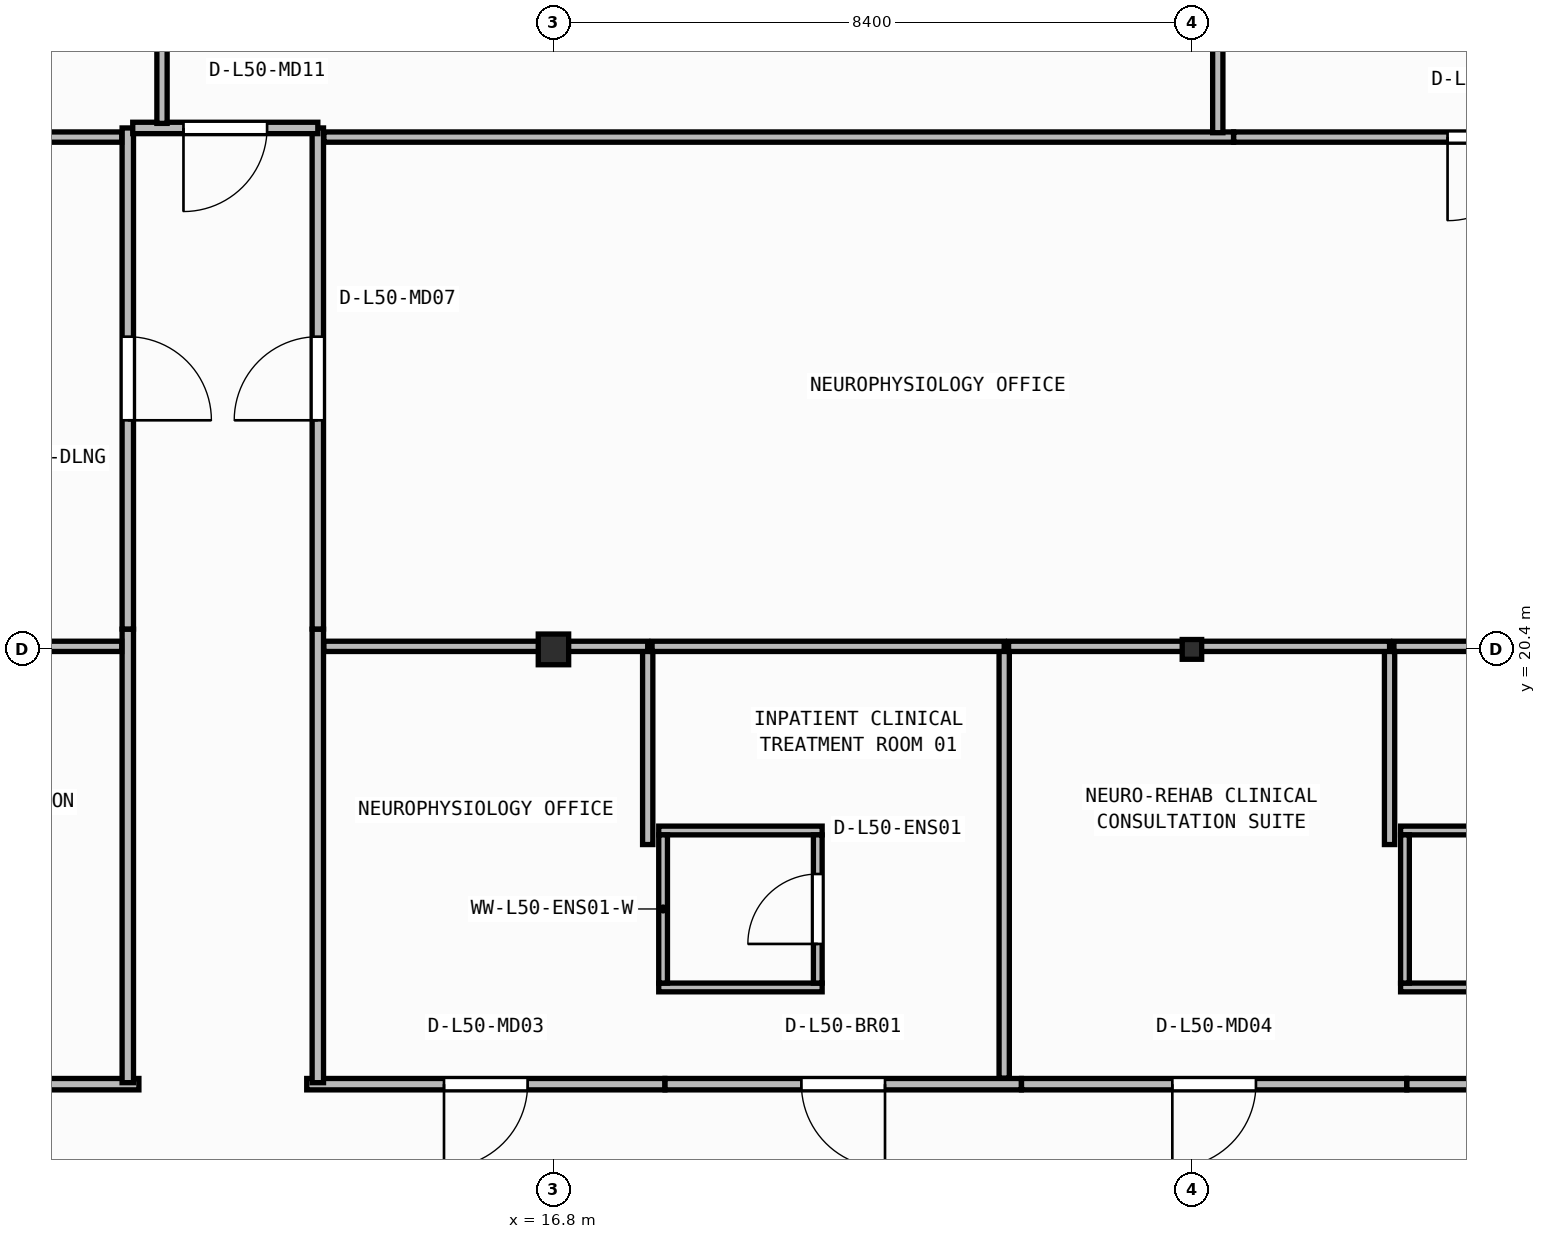
"""IFC4 building model, lengths in metres.
Left out: names, types, materials, properties, quantities, classifications, styles, units other than length and angle.
Written with IfcOpenShell. Run it as: python <this file> out.ifc"""

import sys

from ifc_helpers import new_model, si_unit, direction, frame, frame_2d, origin, origin_2d, place, context, subcontext, project, spatial, rectangle, i_section, extrude, element, fill, save


model = new_model("IFC4")
c1 = context("Model", 3, precision=1e-05, world=origin(), true_north=direction((0.0, 1.0)))
c2 = subcontext(c1, "Body", "Model", "MODEL_VIEW")
j1 = project(units=[si_unit("LENGTHUNIT", "METRE"), si_unit("PLANEANGLEUNIT", "RADIAN")], contexts=[c1])
p1 = place(None, origin())
s1 = spatial("IfcSite", under=j1, at=p1, CompositionType="ELEMENT")
p2 = place(p1, origin())
s2 = spatial("IfcBuilding", under=s1, at=p2, CompositionType="ELEMENT")
p3 = place(p2, frame((0.0, 0.0, 203.95)))
s3 = spatial("IfcBuildingStorey", under=s2, at=p3, CompositionType="ELEMENT", Elevation=203.95)
p4 = place(p3, frame((16.8, 20.4, 0.0), z_axis=(0.0, 0.0, 1.0), x_axis=(1.0, 0.0, 0.0)))
e1 = element("IfcColumn", 1, at=p4, inside=s3, PredefinedType="COLUMN", context=c2, shape_type="SweptSolid", body=[
    extrude(i_section(OverallWidth=0.4, OverallDepth=0.404, WebThickness=0.02, FlangeThickness=0.032, at=origin_2d()), origin(), (0.0, 0.0, 1.0), 3.95),
])
p5 = place(p3, frame((25.2, 20.4, 0.0), z_axis=(0.0, 0.0, 1.0), x_axis=(1.0, 0.0, 0.0)))
e2 = element("IfcColumn", 2, at=p5, inside=s3, PredefinedType="COLUMN", context=c2, shape_type="SweptSolid", body=[
    extrude(i_section(OverallWidth=0.256, OverallDepth=0.26, WebThickness=0.01, FlangeThickness=0.017, FilletRadius=0.013, at=origin_2d()), origin(), (0.0, 0.0, 1.0), 3.95),
])
for number, where, z_axis, x_axis in (
    (3, (18.185, 15.952, 0.0), (0.0, 0.0, 1.0), (1.0, 0.0, 0.0)),
    (4, (18.185, 18.018, 0.0), (0.0, 0.0, 1.0), (1.0, 0.0, 0.0)),
):
    element("IfcWall", number, at=place(p3, frame(where, z_axis=z_axis, x_axis=x_axis)), inside=s3, PredefinedType="PARTITIONING", context=c2, shape_type="SweptSolid", body=[
        extrude(rectangle(XDim=2.15, YDim=0.115, at=frame_2d((1.075, 0.0))), origin(), (0.0, 0.0, 1.0), 3.71),
    ])
p6 = place(p3, frame((18.242, 16.01, 0.0), z_axis=(0.0, 0.0, 1.0), x_axis=(0.0, 1.0, 0.0)))
e5 = element("IfcWall", 5, at=p6, inside=s3, PredefinedType="PARTITIONING", context=c2, shape_type="SweptSolid", body=[
    extrude(rectangle(XDim=1.95, YDim=0.115, at=frame_2d((0.975, 0.0))), origin(), (0.0, 0.0, 1.0), 3.71),
])
p7 = place(p3, frame((20.278, 16.01, 0.0), z_axis=(0.0, 0.0, 1.0), x_axis=(0.0, 1.0, 0.0)))
e6 = element("IfcWall", 6, at=p7, inside=s3, PredefinedType="PARTITIONING", context=c2, shape_type="SweptSolid", body=[
    extrude(rectangle(XDim=1.95, YDim=0.115, at=frame_2d((0.975, 0.0))), origin(), (0.0, 0.0, 1.0), 3.71),
])
p8 = place(p7, frame((0.515, 0.0, 0.0)))
e7 = element("IfcOpeningElement", 7, at=p8, cuts=e6, PredefinedType="OPENING", context=c2, shape_type="SweptSolid", body=[
    extrude(rectangle(XDim=0.92, YDim=2.1, at=frame_2d((0.46, 1.05))), frame((0.0, 0.067, 0.0), z_axis=(0.0, -1.0, 0.0), x_axis=(1.0, 0.0, 0.0)), (0.0, 0.0, 1.0), 0.135),
])
p9 = place(p3, frame((27.945, 15.952, 0.0), z_axis=(0.0, 0.0, 1.0), x_axis=(1.0, 0.0, 0.0)))
e8 = element("IfcWall", 8, at=p9, inside=s3, PredefinedType="PARTITIONING", context=c2, shape_type="SweptSolid", body=[
    extrude(rectangle(XDim=2.15, YDim=0.115, at=frame_2d((1.075, 0.0))), origin(), (0.0, 0.0, 1.0), 3.381),
])
p10 = place(p3, frame((27.945, 18.018, 0.0), z_axis=(0.0, 0.0, 1.0), x_axis=(1.0, 0.0, 0.0)))
e9 = element("IfcWall", 9, at=p10, inside=s3, PredefinedType="PARTITIONING", context=c2, shape_type="SweptSolid", body=[
    extrude(rectangle(XDim=2.15, YDim=0.115, at=frame_2d((1.075, 0.0))), origin(), (0.0, 0.0, 1.0), 3.71),
])
p11 = place(p3, frame((28.002, 16.01, 0.0), z_axis=(0.0, 0.0, 1.0), x_axis=(0.0, 1.0, 0.0)))
e10 = element("IfcWall", 10, at=p11, inside=s3, PredefinedType="PARTITIONING", context=c2, shape_type="SweptSolid", body=[
    extrude(rectangle(XDim=1.95, YDim=0.115, at=frame_2d((0.975, 0.0))), origin(), (0.0, 0.0, 1.0), 3.71),
])
p12 = place(p3, frame((11.346, 14.68, 0.0), z_axis=(0.0, 0.0, 1.0), x_axis=(-1.0, 0.0, 0.0)))
e11 = element("IfcWall", 11, at=p12, inside=s3, PredefinedType="PARTITIONING", context=c2, shape_type="SweptSolid", body=[
    extrude(rectangle(XDim=4.254, YDim=0.15, at=frame_2d((2.127, 0.0))), origin(), (0.0, 0.0, 1.0), 3.71),
])
p13 = place(p12, frame((1.577, 0.0, 0.0)))
e12 = element("IfcOpeningElement", 12, at=p13, cuts=e11, PredefinedType="OPENING", context=c2, shape_type="SweptSolid", body=[
    extrude(rectangle(XDim=1.1, YDim=2.1, at=frame_2d((0.55, 1.05))), frame((0.0, 0.085, 0.0), z_axis=(0.0, -1.0, 0.0), x_axis=(1.0, 0.0, 0.0)), (0.0, 0.0, 1.0), 0.17),
])
p14 = place(p3, frame((18.266, 14.68, 0.0), z_axis=(0.0, 0.0, 1.0), x_axis=(-1.0, 0.0, 0.0)))
e13 = element("IfcWall", 13, at=p14, inside=s3, PredefinedType="PARTITIONING", context=c2, shape_type="SweptSolid", body=[
    extrude(rectangle(XDim=4.712, YDim=0.15, at=frame_2d((2.356, 0.0))), origin(), (0.0, 0.0, 1.0), 3.71),
])
p15 = place(p14, frame((1.806, 0.0, 0.0)))
e14 = element("IfcOpeningElement", 14, at=p15, cuts=e13, PredefinedType="OPENING", context=c2, shape_type="SweptSolid", body=[
    extrude(rectangle(XDim=1.1, YDim=2.1, at=frame_2d((0.55, 1.05))), frame((0.0, 0.085, 0.0), z_axis=(0.0, -1.0, 0.0), x_axis=(1.0, 0.0, 0.0)), (0.0, 0.0, 1.0), 0.17),
])
p16 = place(p3, frame((22.956, 14.68, 0.0), z_axis=(0.0, 0.0, 1.0), x_axis=(-1.0, 0.0, 0.0)))
e15 = element("IfcWall", 15, at=p16, inside=s3, PredefinedType="PARTITIONING", context=c2, shape_type="SweptSolid", body=[
    extrude(rectangle(XDim=4.688, YDim=0.15, at=frame_2d((2.344, 0.0))), origin(), (0.0, 0.0, 1.0), 3.71),
])
p17 = place(p16, frame((1.794, 0.0, 0.0)))
e16 = element("IfcOpeningElement", 16, at=p17, cuts=e15, PredefinedType="OPENING", context=c2, shape_type="SweptSolid", body=[
    extrude(rectangle(XDim=1.1, YDim=2.1, at=frame_2d((0.55, 1.05))), frame((0.0, 0.085, 0.0), z_axis=(0.0, -1.0, 0.0), x_axis=(1.0, 0.0, 0.0)), (0.0, 0.0, 1.0), 0.17),
])
p18 = place(p3, frame((28.026, 14.68, 0.0), z_axis=(0.0, 0.0, 1.0), x_axis=(-1.0, 0.0, 0.0)))
e17 = element("IfcWall", 17, at=p18, inside=s3, PredefinedType="PARTITIONING", context=c2, shape_type="SweptSolid", body=[
    extrude(rectangle(XDim=5.068, YDim=0.15, at=frame_2d((2.534, 0.0))), origin(), (0.0, 0.0, 1.0), 3.71),
])
p19 = place(p18, frame((1.984, 0.0, 0.0)))
e18 = element("IfcOpeningElement", 18, at=p19, cuts=e17, PredefinedType="OPENING", context=c2, shape_type="SweptSolid", body=[
    extrude(rectangle(XDim=1.1, YDim=2.1, at=frame_2d((0.55, 1.05))), frame((0.0, 0.085, 0.0), z_axis=(0.0, -1.0, 0.0), x_axis=(1.0, 0.0, 0.0)), (0.0, 0.0, 1.0), 0.17),
])
p20 = place(p3, frame((32.346, 14.68, 0.0), z_axis=(0.0, 0.0, 1.0), x_axis=(-1.0, 0.0, 0.0)))
e19 = element("IfcWall", 19, at=p20, inside=s3, PredefinedType="PARTITIONING", context=c2, shape_type="SweptSolid", body=[
    extrude(rectangle(XDim=4.318, YDim=0.15, at=frame_2d((2.159, 0.0))), origin(), (0.0, 0.0, 1.0), 3.71),
])
p21 = place(p20, frame((1.609, 0.0, 0.0)))
e20 = element("IfcOpeningElement", 20, at=p21, cuts=e19, PredefinedType="OPENING", context=c2, shape_type="SweptSolid", body=[
    extrude(rectangle(XDim=1.1, YDim=2.1, at=frame_2d((0.55, 1.05))), frame((0.0, 0.085, 0.0), z_axis=(0.0, -1.0, 0.0), x_axis=(1.0, 0.0, 0.0)), (0.0, 0.0, 1.0), 0.17),
])
for number, where, z_axis, x_axis in (
    (21, (11.2, 20.666, 0.0), (0.0, 0.0, 1.0), (0.0, -1.0, 0.0)),
    (22, (13.7, 14.7, 0.0), (0.0, 0.0, 1.0), (0.0, 1.0, 0.0)),
):
    element("IfcWall", number, at=place(p3, frame(where, z_axis=z_axis, x_axis=x_axis)), inside=s3, PredefinedType="PARTITIONING", context=c2, shape_type="SweptSolid", body=[
        extrude(rectangle(XDim=5.966, YDim=0.15, at=frame_2d((2.983, 0.0))), origin(), (0.0, 0.0, 1.0), 3.71),
    ])
p22 = place(p3, frame((11.2, 27.26, 0.0), z_axis=(0.0, 0.0, 1.0), x_axis=(0.0, -1.0, 0.0)))
e23 = element("IfcWall", 23, at=p22, inside=s3, PredefinedType="PARTITIONING", context=c2, shape_type="SweptSolid", body=[
    extrude(rectangle(XDim=6.592, YDim=0.15, at=frame_2d((3.296, 0.0))), origin(), (0.0, 0.0, 1.0), 3.71),
])
p23 = place(p22, frame((2.746, 0.0, 0.0)))
e24 = element("IfcOpeningElement", 24, at=p23, cuts=e23, PredefinedType="OPENING", context=c2, shape_type="SweptSolid", body=[
    extrude(rectangle(XDim=1.1, YDim=2.1, at=frame_2d((0.55, 1.05))), frame((0.0, 0.085, 0.0), z_axis=(0.0, -1.0, 0.0), x_axis=(1.0, 0.0, 0.0)), (0.0, 0.0, 1.0), 0.17),
])
p24 = place(p3, frame((13.7, 20.668, 0.0), z_axis=(0.0, 0.0, 1.0), x_axis=(0.0, 1.0, 0.0)))
e25 = element("IfcWall", 25, at=p24, inside=s3, PredefinedType="PARTITIONING", context=c2, shape_type="SweptSolid", body=[
    extrude(rectangle(XDim=6.592, YDim=0.15, at=frame_2d((3.296, 0.0))), origin(), (0.0, 0.0, 1.0), 3.71),
])
p25 = place(p24, frame((2.746, 0.0, 0.0)))
e26 = element("IfcOpeningElement", 26, at=p25, cuts=e25, PredefinedType="OPENING", context=c2, shape_type="SweptSolid", body=[
    extrude(rectangle(XDim=1.1, YDim=2.1, at=frame_2d((0.55, 1.05))), frame((0.0, 0.085, 0.0), z_axis=(0.0, -1.0, 0.0), x_axis=(1.0, 0.0, 0.0)), (0.0, 0.0, 1.0), 0.17),
])
p26 = place(p3, frame((13.7, 27.26, 0.0), z_axis=(0.0, 0.0, 1.0), x_axis=(-1.0, 0.0, 0.0)))
e27 = element("IfcWall", 27, at=p26, inside=s3, PredefinedType="PARTITIONING", context=c2, shape_type="SweptSolid", body=[
    extrude(rectangle(XDim=2.435, YDim=0.15, at=frame_2d((1.218, 0.0))), origin(), (0.0, 0.0, 1.0), 3.71),
])
p27 = place(p26, frame((0.667, 0.0, 0.0)))
e28 = element("IfcOpeningElement", 28, at=p27, cuts=e27, PredefinedType="OPENING", context=c2, shape_type="SweptSolid", body=[
    extrude(rectangle(XDim=1.1, YDim=2.1, at=frame_2d((0.55, 1.05))), frame((0.0, 0.085, 0.0), z_axis=(0.0, -1.0, 0.0), x_axis=(1.0, 0.0, 0.0)), (0.0, 0.0, 1.0), 0.17),
])
p28 = place(p3, frame((11.12, 20.44, 0.0), z_axis=(0.0, 0.0, 1.0), x_axis=(-1.0, 0.0, 0.0)))
e29 = element("IfcWall", 29, at=p28, inside=s3, PredefinedType="PARTITIONING", context=c2, shape_type="SweptSolid", body=[
    extrude(rectangle(XDim=5.653, YDim=0.135, at=frame_2d((2.826, 0.0))), origin(), (0.0, 0.0, 1.0), 3.152),
])
p29 = place(p3, frame((18.04, 17.833, 0.0), z_axis=(0.0, 0.0, 1.0), x_axis=(0.0, 1.0, 0.0)))
e30 = element("IfcWall", 30, at=p29, inside=s3, PredefinedType="PARTITIONING", context=c2, shape_type="SweptSolid", body=[
    extrude(rectangle(XDim=2.607, YDim=0.135, at=frame_2d((1.304, 0.0))), origin(), (0.0, 0.0, 1.0), 3.71),
])
p30 = place(p3, frame((18.04, 20.44, 0.0), z_axis=(0.0, 0.0, 1.0), x_axis=(-1.0, 0.0, 0.0)))
e31 = element("IfcWall", 31, at=p30, inside=s3, PredefinedType="PARTITIONING", context=c2, shape_type="SweptSolid", body=[
    extrude(rectangle(XDim=4.26, YDim=0.135, at=frame_2d((2.13, 0.0))), origin(), (0.0, 0.0, 1.0), 3.152),
])
p31 = place(p3, frame((22.73, 14.76, 0.0), z_axis=(0.0, 0.0, 1.0), x_axis=(0.0, 1.0, 0.0)))
e32 = element("IfcWall", 32, at=p31, inside=s3, PredefinedType="PARTITIONING", context=c2, shape_type="SweptSolid", body=[
    extrude(rectangle(XDim=5.68, YDim=0.135, at=frame_2d((2.84, 0.0))), origin(), (0.0, 0.0, 1.0), 3.71),
])
p32 = place(p3, frame((22.73, 20.44, 0.0), z_axis=(0.0, 0.0, 1.0), x_axis=(-1.0, 0.0, 0.0)))
e33 = element("IfcWall", 33, at=p32, inside=s3, PredefinedType="PARTITIONING", context=c2, shape_type="SweptSolid", body=[
    extrude(rectangle(XDim=4.633, YDim=0.135, at=frame_2d((2.316, 0.0))), origin(), (0.0, 0.0, 1.0), 3.152),
])
p33 = place(p3, frame((27.8, 17.833, 0.0), z_axis=(0.0, 0.0, 1.0), x_axis=(0.0, 1.0, 0.0)))
e34 = element("IfcWall", 34, at=p33, inside=s3, PredefinedType="PARTITIONING", context=c2, shape_type="SweptSolid", body=[
    extrude(rectangle(XDim=2.607, YDim=0.135, at=frame_2d((1.304, 0.0))), origin(), (0.0, 0.0, 1.0), 3.71),
])
p34 = place(p3, frame((27.8, 20.44, 0.0), z_axis=(0.0, 0.0, 1.0), x_axis=(-1.0, 0.0, 0.0)))
e35 = element("IfcWall", 35, at=p34, inside=s3, PredefinedType="PARTITIONING", context=c2, shape_type="SweptSolid", body=[
    extrude(rectangle(XDim=5.012, YDim=0.135, at=frame_2d((2.506, 0.0))), origin(), (0.0, 0.0, 1.0), 3.152),
])
p35 = place(p3, frame((30.137, 20.44, 0.0), z_axis=(0.0, 0.0, 1.0), x_axis=(-1.0, 0.0, 0.0)))
e36 = element("IfcWall", 36, at=p35, inside=s3, PredefinedType="PARTITIONING", context=c2, shape_type="SweptSolid", body=[
    extrude(rectangle(XDim=2.28, YDim=0.135, at=frame_2d((1.14, 0.0))), origin(), (0.0, 0.0, 1.0), 3.152),
])
p36 = place(p3, frame((11.12, 27.14, 0.0), z_axis=(0.0, 0.0, 1.0), x_axis=(-1.0, 0.0, 0.0)))
e37 = element("IfcWall", 37, at=p36, inside=s3, PredefinedType="PARTITIONING", context=c2, shape_type="SweptSolid", body=[
    extrude(rectangle(XDim=10.88, YDim=0.135, at=frame_2d((5.44, 0.0))), origin(), (0.0, 0.0, 1.0), 3.71),
])
p37 = place(p36, frame((5.828, 0.0, 0.0)))
e38 = element("IfcOpeningElement", 38, at=p37, cuts=e37, PredefinedType="OPENING", context=c2, shape_type="SweptSolid", body=[
    extrude(rectangle(XDim=1.1, YDim=2.1, at=frame_2d((0.55, 1.05))), frame((0.0, 0.077, 0.0), z_axis=(0.0, -1.0, 0.0), x_axis=(1.0, 0.0, 0.0)), (0.0, 0.0, 1.0), 0.155),
])
p38 = place(p3, frame((25.748, 27.14, 0.0), z_axis=(0.0, 0.0, 1.0), x_axis=(-1.0, 0.0, 0.0)))
e39 = element("IfcWall", 39, at=p38, inside=s3, PredefinedType="PARTITIONING", context=c2, shape_type="SweptSolid", body=[
    extrude(rectangle(XDim=11.968, YDim=0.135, at=frame_2d((5.984, 0.0))), origin(), (0.0, 0.0, 1.0), 3.71),
])
p39 = place(p3, frame((29.93, 27.14, 0.0), z_axis=(0.0, 0.0, 1.0), x_axis=(-1.0, 0.0, 0.0)))
e40 = element("IfcWall", 40, at=p39, inside=s3, PredefinedType="PARTITIONING", context=c2, shape_type="SweptSolid", body=[
    extrude(rectangle(XDim=4.18, YDim=0.135, at=frame_2d((2.09, 0.0))), origin(), (0.0, 0.0, 1.0), 3.71),
])
p40 = place(p39, frame((0.267, 0.0, 0.0)))
e41 = element("IfcOpeningElement", 41, at=p40, cuts=e40, PredefinedType="OPENING", context=c2, shape_type="SweptSolid", body=[
    extrude(rectangle(XDim=1.1, YDim=2.1, at=frame_2d((0.55, 1.05))), frame((0.0, 0.077, 0.0), z_axis=(0.0, -1.0, 0.0), x_axis=(1.0, 0.0, 0.0)), (0.0, 0.0, 1.0), 0.155),
])
p41 = place(p3, frame((11.65, 27.32, 0.0), z_axis=(0.0, 0.0, 1.0), x_axis=(0.0, 1.0, 0.0)))
e42 = element("IfcWall", 42, at=p41, inside=s3, PredefinedType="PARTITIONING", context=c2, shape_type="SweptSolid", body=[
    extrude(rectangle(XDim=9.203, YDim=0.135, at=frame_2d((4.602, 0.0))), origin(), (0.0, 0.0, 1.0), 3.71),
])
p42 = place(p3, frame((25.54, 27.198, 0.0), z_axis=(0.0, 0.0, 1.0), x_axis=(0.0, 1.0, 0.0)))
e43 = element("IfcWall", 43, at=p42, inside=s3, PredefinedType="PARTITIONING", context=c2, shape_type="SweptSolid", body=[
    extrude(rectangle(XDim=4.281, YDim=0.135, at=frame_2d((2.141, 0.0))), origin(), (0.0, 0.0, 1.0), 3.157),
])
p43 = place(p8, origin())
e44 = element("IfcDoor", 44, at=p43, inside=s3, OperationType="SINGLE_SWING_LEFT", PredefinedType="DOOR", context=c2, shape_type="SweptSolid", body=[
    extrude(rectangle(XDim=0.92, YDim=2.1, at=frame_2d((0.46, 1.05))), frame((0.0, 0.025, 0.0), z_axis=(0.0, -1.0, 0.0), x_axis=(1.0, 0.0, 0.0)), (0.0, 0.0, 1.0), 0.05),
])
fill(e7, e44)
p44 = place(p15, origin())
e45 = element("IfcDoor", 45, at=p44, inside=s3, OperationType="SINGLE_SWING_RIGHT", PredefinedType="DOOR", context=c2, shape_type="SweptSolid", body=[
    extrude(rectangle(XDim=1.1, YDim=2.1, at=frame_2d((0.55, 1.05))), frame((0.0, 0.025, 0.0), z_axis=(0.0, -1.0, 0.0), x_axis=(1.0, 0.0, 0.0)), (0.0, 0.0, 1.0), 0.05),
])
fill(e14, e45)
p45 = place(p17, origin())
e46 = element("IfcDoor", 46, at=p45, inside=s3, OperationType="SINGLE_SWING_LEFT", PredefinedType="DOOR", context=c2, shape_type="SweptSolid", body=[
    extrude(rectangle(XDim=1.1, YDim=2.1, at=frame_2d((0.55, 1.05))), frame((0.0, 0.025, 0.0), z_axis=(0.0, -1.0, 0.0), x_axis=(1.0, 0.0, 0.0)), (0.0, 0.0, 1.0), 0.05),
])
fill(e16, e46)
p46 = place(p19, origin())
e47 = element("IfcDoor", 47, at=p46, inside=s3, OperationType="SINGLE_SWING_RIGHT", PredefinedType="DOOR", context=c2, shape_type="SweptSolid", body=[
    extrude(rectangle(XDim=1.1, YDim=2.1, at=frame_2d((0.55, 1.05))), frame((0.0, 0.025, 0.0), z_axis=(0.0, -1.0, 0.0), x_axis=(1.0, 0.0, 0.0)), (0.0, 0.0, 1.0), 0.05),
])
fill(e18, e47)
p47 = place(p23, origin())
e48 = element("IfcDoor", 48, at=p47, inside=s3, OperationType="SINGLE_SWING_RIGHT", PredefinedType="DOOR", context=c2, shape_type="SweptSolid", body=[
    extrude(rectangle(XDim=1.1, YDim=2.1, at=frame_2d((0.55, 1.05))), frame((0.0, 0.025, 0.0), z_axis=(0.0, -1.0, 0.0), x_axis=(1.0, 0.0, 0.0)), (0.0, 0.0, 1.0), 0.05),
])
fill(e24, e48)
p48 = place(p25, origin())
e49 = element("IfcDoor", 49, at=p48, inside=s3, OperationType="SINGLE_SWING_LEFT", PredefinedType="DOOR", context=c2, shape_type="SweptSolid", body=[
    extrude(rectangle(XDim=1.1, YDim=2.1, at=frame_2d((0.55, 1.05))), frame((0.0, 0.025, 0.0), z_axis=(0.0, -1.0, 0.0), x_axis=(1.0, 0.0, 0.0)), (0.0, 0.0, 1.0), 0.05),
])
fill(e26, e49)
p49 = place(p27, origin())
e50 = element("IfcDoor", 50, at=p49, inside=s3, OperationType="SINGLE_SWING_RIGHT", PredefinedType="DOOR", context=c2, shape_type="SweptSolid", body=[
    extrude(rectangle(XDim=1.1, YDim=2.1, at=frame_2d((0.55, 1.05))), frame((0.0, 0.025, 0.0), z_axis=(0.0, -1.0, 0.0), x_axis=(1.0, 0.0, 0.0)), (0.0, 0.0, 1.0), 0.05),
])
fill(e28, e50)
p50 = place(p40, origin())
e51 = element("IfcDoor", 51, at=p50, inside=s3, OperationType="SINGLE_SWING_RIGHT", PredefinedType="DOOR", context=c2, shape_type="SweptSolid", body=[
    extrude(rectangle(XDim=1.1, YDim=2.1, at=frame_2d((0.55, 1.05))), frame((0.0, 0.025, 0.0), z_axis=(0.0, -1.0, 0.0), x_axis=(1.0, 0.0, 0.0)), (0.0, 0.0, 1.0), 0.05),
])
fill(e41, e51)
save(model, sys.argv[1])
